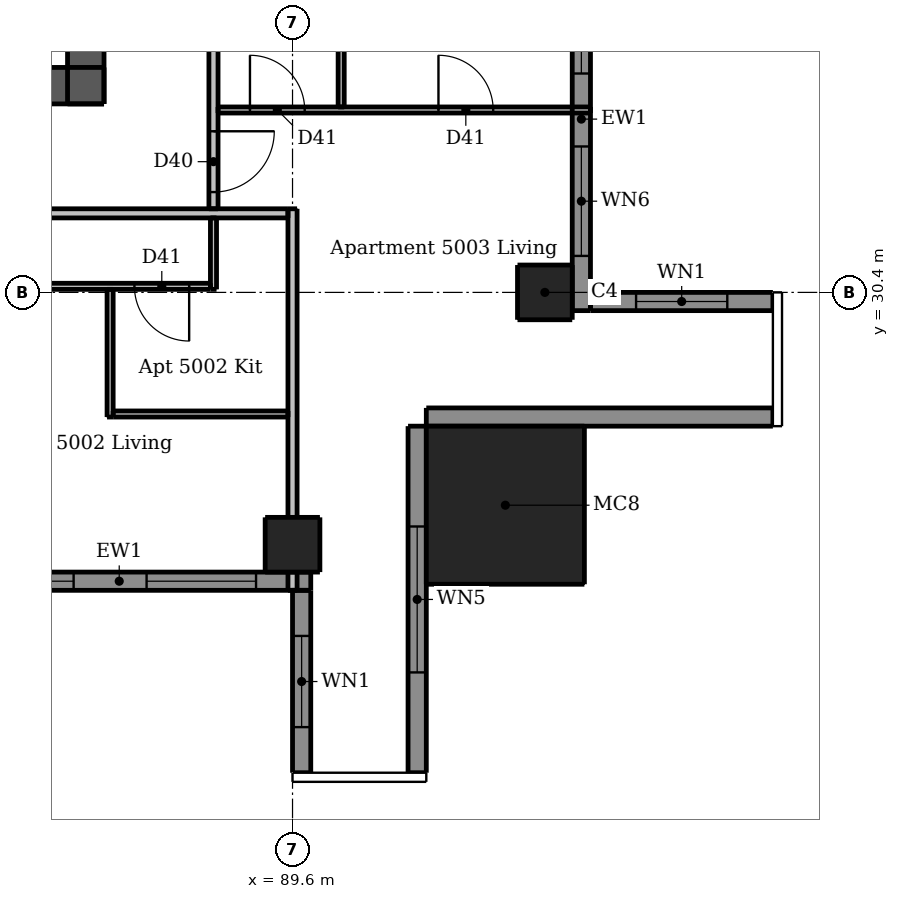
"""IFC4 building model, lengths in metres.
Left out: names, types, materials, properties, quantities, classifications, styles, units other than length and angle.
Written with IfcOpenShell. Run it as: python <this file> out.ifc"""

import sys

from ifc_helpers import new_model, si_unit, direction, frame, frame_2d, origin, origin_2d, place, context, subcontext, project, spatial, rectangle, extrude, element, fill, save


model = new_model("IFC4")
c1 = context("Model", 3, precision=1e-05, world=origin(), true_north=direction((0.0, 1.0)))
c2 = subcontext(c1, "Body", "Model", "MODEL_VIEW")
j1 = project(units=[si_unit("LENGTHUNIT", "METRE"), si_unit("PLANEANGLEUNIT", "RADIAN")], contexts=[c1])
p1 = place(None, origin())
s1 = spatial("IfcSite", under=j1, at=p1, CompositionType="ELEMENT")
p2 = place(p1, origin())
s2 = spatial("IfcBuilding", under=s1, at=p2, CompositionType="ELEMENT")
p3 = place(p2, frame((0.0, 0.0, 190.3)))
s3 = spatial("IfcBuildingStorey", under=s2, at=p3, CompositionType="ELEMENT", Elevation=190.3)
p4 = place(p3, frame((62.5, 33.8, 0.0), z_axis=(0.0, 0.0, 1.0), x_axis=(1.0, 0.0, 0.0)))
e1 = element("IfcWall", 1, at=p4, inside=s3, PredefinedType="SHEAR", context=c2, shape_type="SweptSolid", body=[
    extrude(rectangle(XDim=24.0, YDim=0.6, at=frame_2d((12.0, 0.0))), origin(), (0.0, 0.0, 1.0), 3.05),
])
p5 = place(p4, frame((1.925, 0.0, 0.0)))
e2 = element("IfcOpeningElement", 2, at=p5, cuts=e1, PredefinedType="OPENING", context=c2, shape_type="SweptSolid", body=[
    extrude(rectangle(XDim=1.1, YDim=2.1, at=frame_2d((0.55, 1.05))), frame((0.0, 0.31, 0.0), z_axis=(0.0, -1.0, 0.0), x_axis=(1.0, 0.0, 0.0)), (0.0, 0.0, 1.0), 0.62),
])
p6 = place(p4, frame((20.975, 0.0, 0.0)))
e3 = element("IfcOpeningElement", 3, at=p6, cuts=e1, PredefinedType="OPENING", context=c2, shape_type="SweptSolid", body=[
    extrude(rectangle(XDim=1.1, YDim=2.1, at=frame_2d((0.55, 1.05))), frame((0.0, 0.31, 0.0), z_axis=(0.0, -1.0, 0.0), x_axis=(1.0, 0.0, 0.0)), (0.0, 0.0, 1.0), 0.62),
])
p7 = place(p4, frame((8.0, 0.0, 0.0)))
e4 = element("IfcOpeningElement", 4, at=p7, cuts=e1, PredefinedType="OPENING", context=c2, shape_type="SweptSolid", body=[
    extrude(rectangle(XDim=1.1, YDim=2.1, at=frame_2d((0.55, 1.05))), frame((0.0, 0.31, 0.0), z_axis=(0.0, -1.0, 0.0), x_axis=(1.0, 0.0, 0.0)), (0.0, 0.0, 1.0), 0.62),
])
p8 = place(p4, frame((13.5, 0.0, 0.0)))
e5 = element("IfcOpeningElement", 5, at=p8, cuts=e1, PredefinedType="OPENING", context=c2, shape_type="SweptSolid", body=[
    extrude(rectangle(XDim=0.9, YDim=2.1, at=frame_2d((0.45, 1.05))), frame((0.0, 0.31, 0.0), z_axis=(0.0, -1.0, 0.0), x_axis=(1.0, 0.0, 0.0)), (0.0, 0.0, 1.0), 0.62),
])
p9 = place(p4, frame((17.1, 0.0, 0.0)))
e6 = element("IfcOpeningElement", 6, at=p9, cuts=e1, PredefinedType="OPENING", context=c2, shape_type="SweptSolid", body=[
    extrude(rectangle(XDim=0.9, YDim=2.1, at=frame_2d((0.45, 1.05))), frame((0.0, 0.31, 0.0), z_axis=(0.0, -1.0, 0.0), x_axis=(1.0, 0.0, 0.0)), (0.0, 0.0, 1.0), 0.62),
])
p10 = place(p3, frame((86.2, 33.5, 0.0), z_axis=(0.0, 0.0, 1.0), x_axis=(0.0, 1.0, 0.0)))
e7 = element("IfcWall", 7, at=p10, inside=s3, PredefinedType="SHEAR", context=c2, shape_type="SweptSolid", body=[
    extrude(rectangle(XDim=24.0, YDim=0.6, at=frame_2d((12.0, 0.0))), origin(), (0.0, 0.0, 1.0), 3.05),
])
p11 = place(p10, frame((11.2, 0.0, 0.0)))
e8 = element("IfcOpeningElement", 8, at=p11, cuts=e7, PredefinedType="OPENING", context=c2, shape_type="SweptSolid", body=[
    extrude(rectangle(XDim=1.6, YDim=2.1, at=frame_2d((0.8, 1.05))), frame((0.0, 0.31, 0.0), z_axis=(0.0, -1.0, 0.0), x_axis=(1.0, 0.0, 0.0)), (0.0, 0.0, 1.0), 0.62),
])
for number, where, z_axis, x_axis in (
    (9, (89.6, 26.25, 0.0), (0.0, 0.0, 1.0), (1.0, 0.0, 0.0)),
    (10, (93.75, 30.4, 0.0), (0.0, 0.0, 1.0), (1.0, 0.0, 0.0)),
):
    element("IfcColumn", number, at=place(p3, frame(where, z_axis=z_axis, x_axis=x_axis)), inside=s3, PredefinedType="COLUMN", context=c2, shape_type="SweptSolid", body=[
        extrude(rectangle(XDim=0.9, YDim=0.9, at=origin_2d()), origin(), (0.0, 0.0, 1.0), 3.05),
    ])
p12 = place(p3, frame((93.1, 26.9, 0.0), z_axis=(0.0, 0.0, 1.0), x_axis=(1.0, 0.0, 0.0)))
e11 = element("IfcColumn", 11, at=p12, inside=s3, PredefinedType="COLUMN", context=c2, shape_type="SweptSolid", body=[
    extrude(rectangle(XDim=2.6, YDim=2.6, at=origin_2d()), origin(), (0.0, 0.0, 1.0), 3.3),
])
p13 = place(p3, frame((89.75, 25.5, 0.0), z_axis=(0.0, 0.0, 1.0), x_axis=(0.0, -1.0, 0.0)))
e12 = element("IfcWall", 12, at=p13, inside=s3, PredefinedType="SOLIDWALL", context=c2, shape_type="SweptSolid", body=[
    extrude(rectangle(XDim=3.0, YDim=0.3, at=frame_2d((1.5, 0.0))), origin(), (0.0, 0.0, 1.0), 3.05),
])
p14 = place(p13, frame((0.75, 0.0, 0.9)))
e13 = element("IfcOpeningElement", 13, at=p14, cuts=e12, PredefinedType="OPENING", context=c2, shape_type="SweptSolid", body=[
    extrude(rectangle(XDim=1.5, YDim=1.5, at=frame_2d((0.75, 0.75))), frame((0.0, 0.16, 0.0), z_axis=(0.0, -1.0, 0.0), x_axis=(1.0, 0.0, 0.0)), (0.0, 0.0, 1.0), 0.32),
])
p15 = place(p3, frame((91.65, 22.5, 0.0), z_axis=(0.0, 0.0, 1.0), x_axis=(0.0, 1.0, 0.0)))
e14 = element("IfcWall", 14, at=p15, inside=s3, PredefinedType="SOLIDWALL", context=c2, shape_type="SweptSolid", body=[
    extrude(rectangle(XDim=5.7, YDim=0.3, at=frame_2d((2.85, 0.0))), origin(), (0.0, 0.0, 1.0), 3.05),
])
p16 = place(p15, frame((1.65, 0.0, 0.15)))
e15 = element("IfcOpeningElement", 15, at=p16, cuts=e14, PredefinedType="OPENING", context=c2, shape_type="SweptSolid", body=[
    extrude(rectangle(XDim=2.4, YDim=2.1, at=frame_2d((1.2, 1.05))), frame((0.0, 0.16, 0.0), z_axis=(0.0, -1.0, 0.0), x_axis=(1.0, 0.0, 0.0)), (0.0, 0.0, 1.0), 0.32),
])
p17 = place(p3, frame((91.8, 28.35, 0.0), z_axis=(0.0, 0.0, 1.0), x_axis=(1.0, 0.0, 0.0)))
e16 = element("IfcWall", 16, at=p17, inside=s3, PredefinedType="SOLIDWALL", context=c2, shape_type="SweptSolid", body=[
    extrude(rectangle(XDim=5.7, YDim=0.3, at=frame_2d((2.85, 0.0))), origin(), (0.0, 0.0, 1.0), 3.05),
])
p18 = place(p3, frame((97.5, 30.25, 0.0), z_axis=(0.0, 0.0, 1.0), x_axis=(-1.0, 0.0, 0.0)))
e17 = element("IfcWall", 17, at=p18, inside=s3, PredefinedType="SOLIDWALL", context=c2, shape_type="SweptSolid", body=[
    extrude(rectangle(XDim=3.0, YDim=0.3, at=frame_2d((1.5, 0.0))), origin(), (0.0, 0.0, 1.0), 3.05),
])
p19 = place(p18, frame((0.75, 0.0, 0.9)))
e18 = element("IfcOpeningElement", 18, at=p19, cuts=e17, PredefinedType="OPENING", context=c2, shape_type="SweptSolid", body=[
    extrude(rectangle(XDim=1.5, YDim=1.5, at=frame_2d((0.75, 0.75))), frame((0.0, 0.16, 0.0), z_axis=(0.0, -1.0, 0.0), x_axis=(1.0, 0.0, 0.0)), (0.0, 0.0, 1.0), 0.32),
])
p20 = place(p3, frame((83.6, 25.65, 0.0), z_axis=(0.0, 0.0, 1.0), x_axis=(1.0, 0.0, 0.0)))
e19 = element("IfcWall", 19, at=p20, inside=s3, PredefinedType="SOLIDWALL", context=c2, shape_type="SweptSolid", body=[
    extrude(rectangle(XDim=6.3, YDim=0.3, at=frame_2d((3.15, 0.0))), origin(), (0.0, 0.0, 1.0), 3.05),
])
p21 = place(p20, frame((0.6, 0.0, 0.15)))
e20 = element("IfcOpeningElement", 20, at=p21, cuts=e19, PredefinedType="OPENING", context=c2, shape_type="SweptSolid", body=[
    extrude(rectangle(XDim=1.8, YDim=2.1, at=frame_2d((0.9, 1.05))), frame((0.0, 0.16, 0.0), z_axis=(0.0, -1.0, 0.0), x_axis=(1.0, 0.0, 0.0)), (0.0, 0.0, 1.0), 0.32),
])
p22 = place(p20, frame((3.6, 0.0, 0.15)))
e21 = element("IfcOpeningElement", 21, at=p22, cuts=e19, PredefinedType="OPENING", context=c2, shape_type="SweptSolid", body=[
    extrude(rectangle(XDim=1.8, YDim=2.1, at=frame_2d((0.9, 1.05))), frame((0.0, 0.16, 0.0), z_axis=(0.0, -1.0, 0.0), x_axis=(1.0, 0.0, 0.0)), (0.0, 0.0, 1.0), 0.32),
])
p23 = place(p3, frame((94.35, 30.1, 0.0), z_axis=(0.0, 0.0, 1.0), x_axis=(0.0, 1.0, 0.0)))
e22 = element("IfcWall", 22, at=p23, inside=s3, PredefinedType="SOLIDWALL", context=c2, shape_type="SweptSolid", body=[
    extrude(rectangle(XDim=6.3, YDim=0.3, at=frame_2d((3.15, 0.0))), origin(), (0.0, 0.0, 1.0), 3.05),
])
p24 = place(p23, frame((0.9, 0.0, 0.15)))
e23 = element("IfcOpeningElement", 23, at=p24, cuts=e22, PredefinedType="OPENING", context=c2, shape_type="SweptSolid", body=[
    extrude(rectangle(XDim=1.8, YDim=2.1, at=frame_2d((0.9, 1.05))), frame((0.0, 0.16, 0.0), z_axis=(0.0, -1.0, 0.0), x_axis=(1.0, 0.0, 0.0)), (0.0, 0.0, 1.0), 0.32),
])
p25 = place(p23, frame((3.9, 0.0, 0.15)))
e24 = element("IfcOpeningElement", 24, at=p25, cuts=e22, PredefinedType="OPENING", context=c2, shape_type="SweptSolid", body=[
    extrude(rectangle(XDim=1.8, YDim=2.1, at=frame_2d((0.9, 1.05))), frame((0.0, 0.16, 0.0), z_axis=(0.0, -1.0, 0.0), x_axis=(1.0, 0.0, 0.0)), (0.0, 0.0, 1.0), 0.32),
])
p26 = place(p3, frame((86.6, 28.35, 0.0), z_axis=(0.0, 0.0, 1.0), x_axis=(0.0, 1.0, 0.0)))
e25 = element("IfcWall", 25, at=p26, inside=s3, PredefinedType="PARTITIONING", context=c2, shape_type="SweptSolid", body=[
    extrude(rectangle(XDim=2.1, YDim=0.1, at=frame_2d((1.05, 0.0))), origin(), (0.0, 0.0, 1.0), 3.05),
])
p27 = place(p3, frame((88.3, 30.45, 0.0), z_axis=(0.0, 0.0, 1.0), x_axis=(0.0, 1.0, 0.0)))
e26 = element("IfcWall", 26, at=p27, inside=s3, PredefinedType="PARTITIONING", context=c2, shape_type="SweptSolid", body=[
    extrude(rectangle(XDim=1.175, YDim=0.1, at=frame_2d((0.587, 0.0))), origin(), (0.0, 0.0, 1.0), 3.05),
])
p28 = place(p3, frame((90.4, 33.45, 0.0), z_axis=(0.0, 0.0, 1.0), x_axis=(0.0, 1.0, 0.0)))
e27 = element("IfcWall", 27, at=p28, inside=s3, PredefinedType="PARTITIONING", context=c2, shape_type="SweptSolid", body=[
    extrude(rectangle(XDim=5.975, YDim=0.1, at=frame_2d((2.988, 0.0))), origin(), (0.0, 0.0, 1.0), 3.05),
])
p29 = place(p28, frame((3.8, 0.0, 0.0)))
e28 = element("IfcOpeningElement", 28, at=p29, cuts=e27, PredefinedType="OPENING", context=c2, shape_type="SweptSolid", body=[
    extrude(rectangle(XDim=0.8, YDim=2.1, at=frame_2d((0.4, 1.05))), frame((0.0, 0.06, 0.0), z_axis=(0.0, -1.0, 0.0), x_axis=(1.0, 0.0, 0.0)), (0.0, 0.0, 1.0), 0.12),
])
p30 = place(p3, frame((88.375, 33.4, 0.0), z_axis=(0.0, 0.0, 1.0), x_axis=(1.0, 0.0, 0.0)))
e29 = element("IfcWall", 29, at=p30, inside=s3, PredefinedType="PARTITIONING", context=c2, shape_type="SweptSolid", body=[
    extrude(rectangle(XDim=6.125, YDim=0.1, at=frame_2d((3.062, 0.0))), origin(), (0.0, 0.0, 1.0), 3.05),
])
p31 = place(p30, frame((0.525, 0.0, 0.0)))
e30 = element("IfcOpeningElement", 30, at=p31, cuts=e29, PredefinedType="OPENING", context=c2, shape_type="SweptSolid", body=[
    extrude(rectangle(XDim=0.9, YDim=2.1, at=frame_2d((0.45, 1.05))), frame((0.0, 0.06, 0.0), z_axis=(0.0, -1.0, 0.0), x_axis=(1.0, 0.0, 0.0)), (0.0, 0.0, 1.0), 0.12),
])
p32 = place(p30, frame((3.625, 0.0, 0.0)))
e31 = element("IfcOpeningElement", 31, at=p32, cuts=e29, PredefinedType="OPENING", context=c2, shape_type="SweptSolid", body=[
    extrude(rectangle(XDim=0.9, YDim=2.1, at=frame_2d((0.45, 1.05))), frame((0.0, 0.06, 0.0), z_axis=(0.0, -1.0, 0.0), x_axis=(1.0, 0.0, 0.0)), (0.0, 0.0, 1.0), 0.12),
])
p33 = place(p3, frame((88.25, 30.5, 0.0), z_axis=(0.0, 0.0, 1.0), x_axis=(-1.0, 0.0, 0.0)))
e32 = element("IfcWall", 32, at=p33, inside=s3, PredefinedType="PARTITIONING", context=c2, shape_type="SweptSolid", body=[
    extrude(rectangle(XDim=16.575, YDim=0.1, at=frame_2d((8.288, 0.0))), origin(), (0.0, 0.0, 1.0), 3.05),
])
p34 = place(p33, frame((4.15, 0.0, 0.0)))
e33 = element("IfcOpeningElement", 33, at=p34, cuts=e32, PredefinedType="OPENING", context=c2, shape_type="SweptSolid", body=[
    extrude(rectangle(XDim=0.9, YDim=2.1, at=frame_2d((0.45, 1.05))), frame((0.0, 0.06, 0.0), z_axis=(0.0, -1.0, 0.0), x_axis=(1.0, 0.0, 0.0)), (0.0, 0.0, 1.0), 0.12),
])
p35 = place(p33, frame((0.35, 0.0, 0.0)))
e34 = element("IfcOpeningElement", 34, at=p35, cuts=e32, PredefinedType="OPENING", context=c2, shape_type="SweptSolid", body=[
    extrude(rectangle(XDim=0.9, YDim=2.1, at=frame_2d((0.45, 1.05))), frame((0.0, 0.06, 0.0), z_axis=(0.0, -1.0, 0.0), x_axis=(1.0, 0.0, 0.0)), (0.0, 0.0, 1.0), 0.12),
])
p36 = place(p33, frame((14.4, 0.0, 0.0)))
e35 = element("IfcOpeningElement", 35, at=p36, cuts=e32, PredefinedType="OPENING", context=c2, shape_type="SweptSolid", body=[
    extrude(rectangle(XDim=0.9, YDim=2.1, at=frame_2d((0.45, 1.05))), frame((0.0, 0.06, 0.0), z_axis=(0.0, -1.0, 0.0), x_axis=(1.0, 0.0, 0.0)), (0.0, 0.0, 1.0), 0.12),
])
p37 = place(p33, frame((8.65, 0.0, 0.0)))
e36 = element("IfcOpeningElement", 36, at=p37, cuts=e32, PredefinedType="OPENING", context=c2, shape_type="SweptSolid", body=[
    extrude(rectangle(XDim=0.9, YDim=2.1, at=frame_2d((0.45, 1.05))), frame((0.0, 0.06, 0.0), z_axis=(0.0, -1.0, 0.0), x_axis=(1.0, 0.0, 0.0)), (0.0, 0.0, 1.0), 0.12),
])
p38 = place(p33, frame((11.45, 0.0, 0.0)))
e37 = element("IfcOpeningElement", 37, at=p38, cuts=e32, PredefinedType="OPENING", context=c2, shape_type="SweptSolid", body=[
    extrude(rectangle(XDim=0.8, YDim=2.1, at=frame_2d((0.4, 1.05))), frame((0.0, 0.06, 0.0), z_axis=(0.0, -1.0, 0.0), x_axis=(1.0, 0.0, 0.0)), (0.0, 0.0, 1.0), 0.12),
])
p39 = place(p3, frame((86.65, 28.4, 0.0), z_axis=(0.0, 0.0, 1.0), x_axis=(1.0, 0.0, 0.0)))
e38 = element("IfcWall", 38, at=p39, inside=s3, PredefinedType="PARTITIONING", context=c2, shape_type="SweptSolid", body=[
    extrude(rectangle(XDim=2.875, YDim=0.1, at=frame_2d((1.438, 0.0))), origin(), (0.0, 0.0, 1.0), 3.05),
])
p40 = place(p3, frame((88.3, 61.175, 0.0), z_axis=(0.0, 0.0, 1.0), x_axis=(0.0, -1.0, 0.0)))
e39 = element("IfcWall", 39, at=p40, inside=s3, PredefinedType="PARTITIONING", context=c2, shape_type="SweptSolid", body=[
    extrude(rectangle(XDim=29.4, YDim=0.15, at=frame_2d((14.7, 0.0))), origin(), (0.0, 0.0, 1.0), 3.05),
])
p41 = place(p40, frame((28.125, 0.0, 0.0)))
e40 = element("IfcOpeningElement", 40, at=p41, cuts=e39, PredefinedType="OPENING", context=c2, shape_type="SweptSolid", body=[
    extrude(rectangle(XDim=1.0, YDim=2.1, at=frame_2d((0.5, 1.05))), frame((0.0, 0.085, 0.0), z_axis=(0.0, -1.0, 0.0), x_axis=(1.0, 0.0, 0.0)), (0.0, 0.0, 1.0), 0.17),
])
p42 = place(p40, frame((10.725, 0.0, 0.0)))
e41 = element("IfcOpeningElement", 41, at=p42, cuts=e39, PredefinedType="OPENING", context=c2, shape_type="SweptSolid", body=[
    extrude(rectangle(XDim=1.0, YDim=2.1, at=frame_2d((0.5, 1.05))), frame((0.0, 0.085, 0.0), z_axis=(0.0, -1.0, 0.0), x_axis=(1.0, 0.0, 0.0)), (0.0, 0.0, 1.0), 0.17),
])
p43 = place(p3, frame((89.6, 25.5, 0.0), z_axis=(0.0, 0.0, 1.0), x_axis=(0.0, 1.0, 0.0)))
e42 = element("IfcWall", 42, at=p43, inside=s3, PredefinedType="PARTITIONING", context=c2, shape_type="SweptSolid", body=[
    extrude(rectangle(XDim=6.275, YDim=0.15, at=frame_2d((3.137, 0.0))), origin(), (0.0, 0.0, 1.0), 2.516),
])
p44 = place(p3, frame((89.525, 31.7, 0.0), z_axis=(0.0, 0.0, 1.0), x_axis=(-1.0, 0.0, 0.0)))
e43 = element("IfcWall", 43, at=p44, inside=s3, PredefinedType="PARTITIONING", context=c2, shape_type="SweptSolid", body=[
    extrude(rectangle(XDim=30.55, YDim=0.15, at=frame_2d((15.275, 0.0))), origin(), (0.0, 0.0, 1.0), 3.05),
])
p45 = place(p44, frame((26.775, 0.0, 0.0)))
e44 = element("IfcOpeningElement", 44, at=p45, cuts=e43, PredefinedType="OPENING", context=c2, shape_type="SweptSolid", body=[
    extrude(rectangle(XDim=1.0, YDim=2.1, at=frame_2d((0.5, 1.05))), frame((0.0, 0.085, 0.0), z_axis=(0.0, -1.0, 0.0), x_axis=(1.0, 0.0, 0.0)), (0.0, 0.0, 1.0), 0.17),
])
p46 = place(p44, frame((9.075, 0.0, 0.0)))
e45 = element("IfcOpeningElement", 45, at=p46, cuts=e43, PredefinedType="OPENING", context=c2, shape_type="SweptSolid", body=[
    extrude(rectangle(XDim=1.0, YDim=2.1, at=frame_2d((0.5, 1.05))), frame((0.0, 0.085, 0.0), z_axis=(0.0, -1.0, 0.0), x_axis=(1.0, 0.0, 0.0)), (0.0, 0.0, 1.0), 0.17),
])
p47 = place(p14, origin())
e46 = element("IfcWindow", 46, at=p47, inside=s3, PartitioningType="DOUBLE_PANEL_VERTICAL", PredefinedType="WINDOW", context=c2, shape_type="SweptSolid", body=[
    extrude(rectangle(XDim=1.5, YDim=1.5, at=frame_2d((0.75, 0.75))), frame((0.0, 0.03, 0.0), z_axis=(0.0, -1.0, 0.0), x_axis=(1.0, 0.0, 0.0)), (0.0, 0.0, 1.0), 0.06),
])
fill(e13, e46)
p48 = place(p16, origin())
e47 = element("IfcWindow", 47, at=p48, inside=s3, PartitioningType="DOUBLE_PANEL_VERTICAL", PredefinedType="WINDOW", context=c2, shape_type="SweptSolid", body=[
    extrude(rectangle(XDim=2.4, YDim=2.1, at=frame_2d((1.2, 1.05))), frame((0.0, 0.03, 0.0), z_axis=(0.0, -1.0, 0.0), x_axis=(1.0, 0.0, 0.0)), (0.0, 0.0, 1.0), 0.06),
])
fill(e15, e47)
p49 = place(p19, origin())
e48 = element("IfcWindow", 48, at=p49, inside=s3, PartitioningType="DOUBLE_PANEL_VERTICAL", PredefinedType="WINDOW", context=c2, shape_type="SweptSolid", body=[
    extrude(rectangle(XDim=1.5, YDim=1.5, at=frame_2d((0.75, 0.75))), frame((0.0, 0.03, 0.0), z_axis=(0.0, -1.0, 0.0), x_axis=(1.0, 0.0, 0.0)), (0.0, 0.0, 1.0), 0.06),
])
fill(e18, e48)
p50 = place(p21, origin())
e49 = element("IfcWindow", 49, at=p50, inside=s3, PartitioningType="DOUBLE_PANEL_VERTICAL", PredefinedType="WINDOW", context=c2, shape_type="SweptSolid", body=[
    extrude(rectangle(XDim=1.8, YDim=2.1, at=frame_2d((0.9, 1.05))), frame((0.0, 0.03, 0.0), z_axis=(0.0, -1.0, 0.0), x_axis=(1.0, 0.0, 0.0)), (0.0, 0.0, 1.0), 0.06),
])
fill(e20, e49)
p51 = place(p22, origin())
e50 = element("IfcWindow", 50, at=p51, inside=s3, PartitioningType="DOUBLE_PANEL_VERTICAL", PredefinedType="WINDOW", context=c2, shape_type="SweptSolid", body=[
    extrude(rectangle(XDim=1.8, YDim=2.1, at=frame_2d((0.9, 1.05))), frame((0.0, 0.03, 0.0), z_axis=(0.0, -1.0, 0.0), x_axis=(1.0, 0.0, 0.0)), (0.0, 0.0, 1.0), 0.06),
])
fill(e21, e50)
p52 = place(p24, origin())
e51 = element("IfcWindow", 51, at=p52, inside=s3, PartitioningType="DOUBLE_PANEL_VERTICAL", PredefinedType="WINDOW", context=c2, shape_type="SweptSolid", body=[
    extrude(rectangle(XDim=1.8, YDim=2.1, at=frame_2d((0.9, 1.05))), frame((0.0, 0.03, 0.0), z_axis=(0.0, -1.0, 0.0), x_axis=(1.0, 0.0, 0.0)), (0.0, 0.0, 1.0), 0.06),
])
fill(e23, e51)
p53 = place(p25, origin())
e52 = element("IfcWindow", 52, at=p53, inside=s3, PartitioningType="DOUBLE_PANEL_VERTICAL", PredefinedType="WINDOW", context=c2, shape_type="SweptSolid", body=[
    extrude(rectangle(XDim=1.8, YDim=2.1, at=frame_2d((0.9, 1.05))), frame((0.0, 0.03, 0.0), z_axis=(0.0, -1.0, 0.0), x_axis=(1.0, 0.0, 0.0)), (0.0, 0.0, 1.0), 0.06),
])
fill(e24, e52)
p54 = place(p35, origin())
e53 = element("IfcDoor", 53, at=p54, inside=s3, OperationType="SINGLE_SWING_LEFT", PredefinedType="DOOR", context=c2, shape_type="SweptSolid", body=[
    extrude(rectangle(XDim=0.9, YDim=2.1, at=frame_2d((0.45, 1.05))), frame((0.0, 0.025, 0.0), z_axis=(0.0, -1.0, 0.0), x_axis=(1.0, 0.0, 0.0)), (0.0, 0.0, 1.0), 0.05),
])
fill(e34, e53)
p55 = place(p41, origin())
e54 = element("IfcDoor", 54, at=p55, inside=s3, OperationType="SINGLE_SWING_LEFT", PredefinedType="DOOR", context=c2, shape_type="SweptSolid", body=[
    extrude(rectangle(XDim=1.0, YDim=2.1, at=frame_2d((0.5, 1.05))), frame((0.0, 0.025, 0.0), z_axis=(0.0, -1.0, 0.0), x_axis=(1.0, 0.0, 0.0)), (0.0, 0.0, 1.0), 0.05),
])
fill(e40, e54)
p56 = place(p31, origin())
e55 = element("IfcDoor", 55, at=p56, inside=s3, OperationType="SINGLE_SWING_LEFT", PredefinedType="DOOR", context=c2, shape_type="SweptSolid", body=[
    extrude(rectangle(XDim=0.9, YDim=2.1, at=frame_2d((0.45, 1.05))), frame((0.0, 0.025, 0.0), z_axis=(0.0, -1.0, 0.0), x_axis=(1.0, 0.0, 0.0)), (0.0, 0.0, 1.0), 0.05),
])
fill(e30, e55)
p57 = place(p32, origin())
e56 = element("IfcDoor", 56, at=p57, inside=s3, OperationType="SINGLE_SWING_LEFT", PredefinedType="DOOR", context=c2, shape_type="SweptSolid", body=[
    extrude(rectangle(XDim=0.9, YDim=2.1, at=frame_2d((0.45, 1.05))), frame((0.0, 0.025, 0.0), z_axis=(0.0, -1.0, 0.0), x_axis=(1.0, 0.0, 0.0)), (0.0, 0.0, 1.0), 0.05),
])
fill(e31, e56)
save(model, sys.argv[1])
